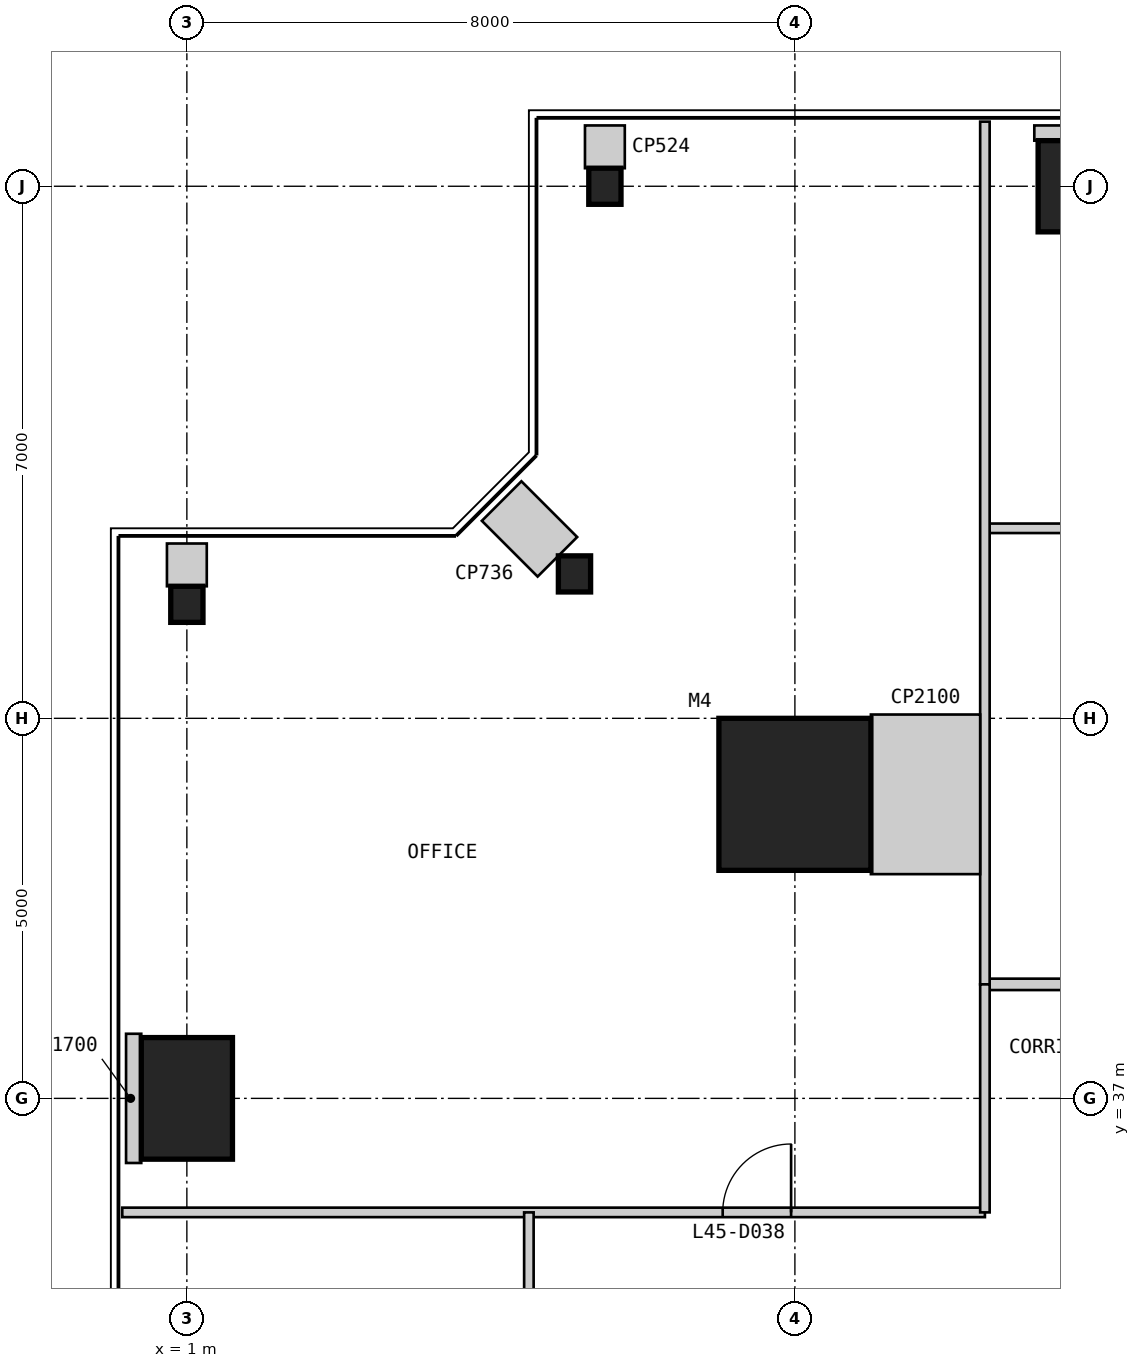
"""IFC4 building model, lengths in metres.
Left out: names, types, materials, properties, quantities, classifications, styles, units other than length and angle.
Written with IfcOpenShell. Run it as: python <this file> out.ifc"""

import sys

from ifc_helpers import new_model, si_unit, direction, frame, frame_2d, origin, origin_2d, place, context, subcontext, project, spatial, rectangle, i_section, extrude, element, fill, save


model = new_model("IFC4")
c1 = context("Model", 3, precision=1e-05, world=origin(), true_north=direction((0.0, 1.0)))
c2 = subcontext(c1, "Body", "Model", "MODEL_VIEW")
j1 = project(units=[si_unit("LENGTHUNIT", "METRE"), si_unit("PLANEANGLEUNIT", "RADIAN")], contexts=[c1])
p1 = place(None, origin())
s1 = spatial("IfcSite", under=j1, at=p1, CompositionType="ELEMENT")
p2 = place(p1, origin())
s2 = spatial("IfcBuilding", under=s1, at=p2, CompositionType="ELEMENT")
p3 = place(p2, frame((0.0, 0.0, 193.8)))
s3 = spatial("IfcBuildingStorey", under=s2, at=p3, CompositionType="ELEMENT", Elevation=193.8)
p4 = place(p3, frame((9.0, 41.0, 0.0), z_axis=(0.0, 0.0, 1.0), x_axis=(1.0, 0.0, 0.0)))
e1 = element("IfcColumn", 1, at=p4, inside=s3, PredefinedType="COLUMN", context=c2, shape_type="SweptSolid", body=[
    extrude(rectangle(XDim=2.0, YDim=2.0, at=origin_2d()), origin(), (0.0, 0.0, 1.0), 4.0),
])
p5 = place(p3, frame((13.0, 49.0, 0.0), z_axis=(0.0, 0.0, 1.0), x_axis=(1.0, 0.0, 0.0)))
e2 = element("IfcColumn", 2, at=p5, inside=s3, PredefinedType="COLUMN", context=c2, shape_type="SweptSolid", body=[
    extrude(rectangle(XDim=1.6, YDim=1.2, at=origin_2d()), origin(), (0.0, 0.0, 1.0), 4.0),
])
for number, where, z_axis, x_axis in (
    (3, (6.5, 49.0, 0.0), (0.0, 0.0, 1.0), (1.0, 0.0, 0.0)),
    (4, (6.1, 43.9, 0.0), (0.0, 0.0, 1.0), (1.0, 0.0, 0.0)),
    (5, (1.0, 43.5, 0.0), (0.0, 0.0, 1.0), (1.0, 0.0, 0.0)),
):
    element("IfcColumn", number, at=place(p3, frame(where, z_axis=z_axis, x_axis=x_axis)), inside=s3, PredefinedType="COLUMN", context=c2, shape_type="SweptSolid", body=[
        extrude(i_section(OverallWidth=0.424, OverallDepth=0.475, WebThickness=0.048, FlangeThickness=0.077, at=origin_2d()), origin(), (0.0, 0.0, 1.0), 4.0),
    ])
p6 = place(p3, frame((1.0, 37.0, 0.0), z_axis=(0.0, 0.0, 1.0), x_axis=(1.0, 0.0, 0.0)))
e6 = element("IfcColumn", 6, at=p6, inside=s3, PredefinedType="COLUMN", context=c2, shape_type="SweptSolid", body=[
    extrude(rectangle(XDim=1.2, YDim=1.6, at=origin_2d()), origin(), (0.0, 0.0, 1.0), 4.0),
])
p7 = place(p3, frame((38.5, 38.5, 0.0), z_axis=(0.0, 0.0, 1.0), x_axis=(-1.0, 0.0, 0.0)))
e7 = element("IfcWall", 7, at=p7, inside=s3, PredefinedType="PARTITIONING", context=c2, shape_type="SweptSolid", body=[
    extrude(rectangle(XDim=27.0, YDim=0.15, at=frame_2d((13.5, 0.0))), origin(), (0.0, 0.0, 1.0), 3.85),
])
p8 = place(p7, frame((13.0, 0.0, 0.0)))
e8 = element("IfcOpeningElement", 8, at=p8, cuts=e7, PredefinedType="OPENING", context=c2, shape_type="SweptSolid", body=[
    extrude(rectangle(XDim=1.0, YDim=2.2, at=frame_2d((0.5, 1.1))), frame((0.0, 0.085, 0.0), z_axis=(0.0, -1.0, 0.0), x_axis=(1.0, 0.0, 0.0)), (0.0, 0.0, 1.0), 0.17),
])
p9 = place(p3, frame((35.5, 44.5, 0.0), z_axis=(0.0, 0.0, 1.0), x_axis=(-1.0, 0.0, 0.0)))
e9 = element("IfcWall", 9, at=p9, inside=s3, PredefinedType="PARTITIONING", context=c2, shape_type="SweptSolid", body=[
    extrude(rectangle(XDim=24.0, YDim=0.125, at=frame_2d((12.0, 0.0))), origin(), (0.0, 0.0, 1.0), 3.85),
])
p10 = place(p9, frame((4.05, 0.0, 0.0)))
e10 = element("IfcOpeningElement", 10, at=p10, cuts=e9, PredefinedType="OPENING", context=c2, shape_type="SweptSolid", body=[
    extrude(rectangle(XDim=0.9, YDim=2.2, at=frame_2d((0.45, 1.1))), frame((0.0, 0.073, 0.0), z_axis=(0.0, -1.0, 0.0), x_axis=(1.0, 0.0, 0.0)), (0.0, 0.0, 1.0), 0.145),
])
p11 = place(p9, frame((10.05, 0.0, 0.0)))
e11 = element("IfcOpeningElement", 11, at=p11, cuts=e9, PredefinedType="OPENING", context=c2, shape_type="SweptSolid", body=[
    extrude(rectangle(XDim=0.9, YDim=2.2, at=frame_2d((0.45, 1.1))), frame((0.0, 0.073, 0.0), z_axis=(0.0, -1.0, 0.0), x_axis=(1.0, 0.0, 0.0)), (0.0, 0.0, 1.0), 0.145),
])
p12 = place(p9, frame((16.05, 0.0, 0.0)))
e12 = element("IfcOpeningElement", 12, at=p12, cuts=e9, PredefinedType="OPENING", context=c2, shape_type="SweptSolid", body=[
    extrude(rectangle(XDim=0.9, YDim=2.2, at=frame_2d((0.45, 1.1))), frame((0.0, 0.073, 0.0), z_axis=(0.0, -1.0, 0.0), x_axis=(1.0, 0.0, 0.0)), (0.0, 0.0, 1.0), 0.145),
])
p13 = place(p9, frame((19.05, 0.0, 0.0)))
e13 = element("IfcOpeningElement", 13, at=p13, cuts=e9, PredefinedType="OPENING", context=c2, shape_type="SweptSolid", body=[
    extrude(rectangle(XDim=0.9, YDim=2.2, at=frame_2d((0.45, 1.1))), frame((0.0, 0.073, 0.0), z_axis=(0.0, -1.0, 0.0), x_axis=(1.0, 0.0, 0.0)), (0.0, 0.0, 1.0), 0.145),
])
p14 = place(p3, frame((11.5, 49.85, 0.0), z_axis=(0.0, 0.0, 1.0), x_axis=(0.0, -1.0, 0.0)))
e14 = element("IfcWall", 14, at=p14, inside=s3, PredefinedType="PARTITIONING", context=c2, shape_type="SweptSolid", body=[
    extrude(rectangle(XDim=11.35, YDim=0.125, at=frame_2d((5.675, 0.0))), origin(), (0.0, 0.0, 1.0), 3.85),
])
p15 = place(p3, frame((0.15, 35.5, 0.0), z_axis=(0.0, 0.0, 1.0), x_axis=(1.0, 0.0, 0.0)))
e15 = element("IfcWall", 15, at=p15, inside=s3, PredefinedType="PARTITIONING", context=c2, shape_type="SweptSolid", body=[
    extrude(rectangle(XDim=11.35, YDim=0.125, at=frame_2d((5.675, 0.0))), origin(), (0.0, 0.0, 1.0), 3.85),
])
p16 = place(p15, frame((7.9, 0.0, 0.0)))
e16 = element("IfcOpeningElement", 16, at=p16, cuts=e15, PredefinedType="OPENING", context=c2, shape_type="SweptSolid", body=[
    extrude(rectangle(XDim=0.9, YDim=2.2, at=frame_2d((0.45, 1.1))), frame((0.0, 0.073, 0.0), z_axis=(0.0, -1.0, 0.0), x_axis=(1.0, 0.0, 0.0)), (0.0, 0.0, 1.0), 0.145),
])
p17 = place(p3, frame((5.5, 35.5, 0.0), z_axis=(0.0, 0.0, 1.0), x_axis=(0.0, -1.0, 0.0)))
e17 = element("IfcWall", 17, at=p17, inside=s3, PredefinedType="PARTITIONING", context=c2, shape_type="SweptSolid", body=[
    extrude(rectangle(XDim=24.0, YDim=0.125, at=frame_2d((12.0, 0.0))), origin(), (0.0, 0.0, 1.0), 3.85),
])
p18 = place(p17, frame((4.05, 0.0, 0.0)))
e18 = element("IfcOpeningElement", 18, at=p18, cuts=e17, PredefinedType="OPENING", context=c2, shape_type="SweptSolid", body=[
    extrude(rectangle(XDim=0.9, YDim=2.2, at=frame_2d((0.45, 1.1))), frame((0.0, 0.073, 0.0), z_axis=(0.0, -1.0, 0.0), x_axis=(1.0, 0.0, 0.0)), (0.0, 0.0, 1.0), 0.145),
])
p19 = place(p17, frame((10.05, 0.0, 0.0)))
e19 = element("IfcOpeningElement", 19, at=p19, cuts=e17, PredefinedType="OPENING", context=c2, shape_type="SweptSolid", body=[
    extrude(rectangle(XDim=0.9, YDim=2.2, at=frame_2d((0.45, 1.1))), frame((0.0, 0.073, 0.0), z_axis=(0.0, -1.0, 0.0), x_axis=(1.0, 0.0, 0.0)), (0.0, 0.0, 1.0), 0.145),
])
p20 = place(p17, frame((16.05, 0.0, 0.0)))
e20 = element("IfcOpeningElement", 20, at=p20, cuts=e17, PredefinedType="OPENING", context=c2, shape_type="SweptSolid", body=[
    extrude(rectangle(XDim=0.9, YDim=2.2, at=frame_2d((0.45, 1.1))), frame((0.0, 0.073, 0.0), z_axis=(0.0, -1.0, 0.0), x_axis=(1.0, 0.0, 0.0)), (0.0, 0.0, 1.0), 0.145),
])
p21 = place(p17, frame((19.05, 0.0, 0.0)))
e21 = element("IfcOpeningElement", 21, at=p21, cuts=e17, PredefinedType="OPENING", context=c2, shape_type="SweptSolid", body=[
    extrude(rectangle(XDim=0.9, YDim=2.2, at=frame_2d((0.45, 1.1))), frame((0.0, 0.073, 0.0), z_axis=(0.0, -1.0, 0.0), x_axis=(1.0, 0.0, 0.0)), (0.0, 0.0, 1.0), 0.145),
])
p22 = place(p3, frame((11.5, 38.5, 0.0), z_axis=(0.0, 0.0, 1.0), x_axis=(0.0, -1.0, 0.0)))
e22 = element("IfcWall", 22, at=p22, inside=s3, PredefinedType="PARTITIONING", context=c2, shape_type="SweptSolid", body=[
    extrude(rectangle(XDim=3.0, YDim=0.125, at=frame_2d((1.5, 0.0))), origin(), (0.0, 0.0, 1.0), 3.85),
])
p23 = place(p3, frame((13.0, 49.8, 0.0), z_axis=(0.0, 0.0, 1.0), x_axis=(0.0, -1.0, 0.0)))
e23 = element("IfcWall", 23, at=p23, inside=s3, PredefinedType="PARTITIONING", context=c2, shape_type="SweptSolid", body=[
    extrude(rectangle(XDim=0.2, YDim=1.7, at=frame_2d((0.1, 0.0))), origin(), (0.0, 0.0, 1.0), 3.85),
])
p24 = place(p3, frame((11.438, 41.0, 0.0), z_axis=(0.0, 0.0, 1.0), x_axis=(-1.0, 0.0, 0.0)))
e24 = element("IfcWall", 24, at=p24, inside=s3, PredefinedType="PARTITIONING", context=c2, shape_type="SweptSolid", body=[
    extrude(rectangle(XDim=1.438, YDim=2.1, at=frame_2d((0.719, 0.0))), origin(), (0.0, 0.0, 1.0), 3.85),
])
p25 = place(p3, frame((6.5, 49.8, 0.0), z_axis=(0.0, 0.0, 1.0), x_axis=(0.0, -1.0, 0.0)))
e25 = element("IfcWall", 25, at=p25, inside=s3, PredefinedType="PARTITIONING", context=c2, shape_type="SweptSolid", body=[
    extrude(rectangle(XDim=0.562, YDim=0.524, at=frame_2d((0.281, 0.0))), origin(), (0.0, 0.0, 1.0), 3.85),
])
p26 = place(p3, frame((5.141, 44.859, 0.0), z_axis=(0.0, 0.0, 1.0), x_axis=(0.707106781187, -0.707106781187, 0.0)))
e26 = element("IfcWall", 26, at=p26, inside=s3, PredefinedType="PARTITIONING", context=c2, shape_type="SweptSolid", body=[
    extrude(rectangle(XDim=1.038, YDim=0.736, at=frame_2d((0.519, 0.0))), origin(), (0.0, 0.0, 1.0), 3.85),
])
p27 = place(p3, frame((1.0, 44.3, 0.0), z_axis=(0.0, 0.0, 1.0), x_axis=(0.0, -1.0, 0.0)))
e27 = element("IfcWall", 27, at=p27, inside=s3, PredefinedType="PARTITIONING", context=c2, shape_type="SweptSolid", body=[
    extrude(rectangle(XDim=0.562, YDim=0.524, at=frame_2d((0.281, 0.0))), origin(), (0.0, 0.0, 1.0), 3.85),
])
p28 = place(p3, frame((0.2, 37.0, 0.0), z_axis=(0.0, 0.0, 1.0), x_axis=(1.0, 0.0, 0.0)))
e28 = element("IfcWall", 28, at=p28, inside=s3, PredefinedType="PARTITIONING", context=c2, shape_type="SweptSolid", body=[
    extrude(rectangle(XDim=0.2, YDim=1.7, at=frame_2d((0.1, 0.0))), origin(), (0.0, 0.0, 1.0), 3.85),
])
p29 = place(p16, origin())
e29 = element("IfcDoor", 29, at=p29, inside=s3, OperationType="SINGLE_SWING_RIGHT", PredefinedType="DOOR", context=c2, shape_type="SweptSolid", body=[
    extrude(rectangle(XDim=0.9, YDim=2.2, at=frame_2d((0.45, 1.1))), frame((0.0, 0.025, 0.0), z_axis=(0.0, -1.0, 0.0), x_axis=(1.0, 0.0, 0.0)), (0.0, 0.0, 1.0), 0.05),
])
fill(e16, e29)
save(model, sys.argv[1])
